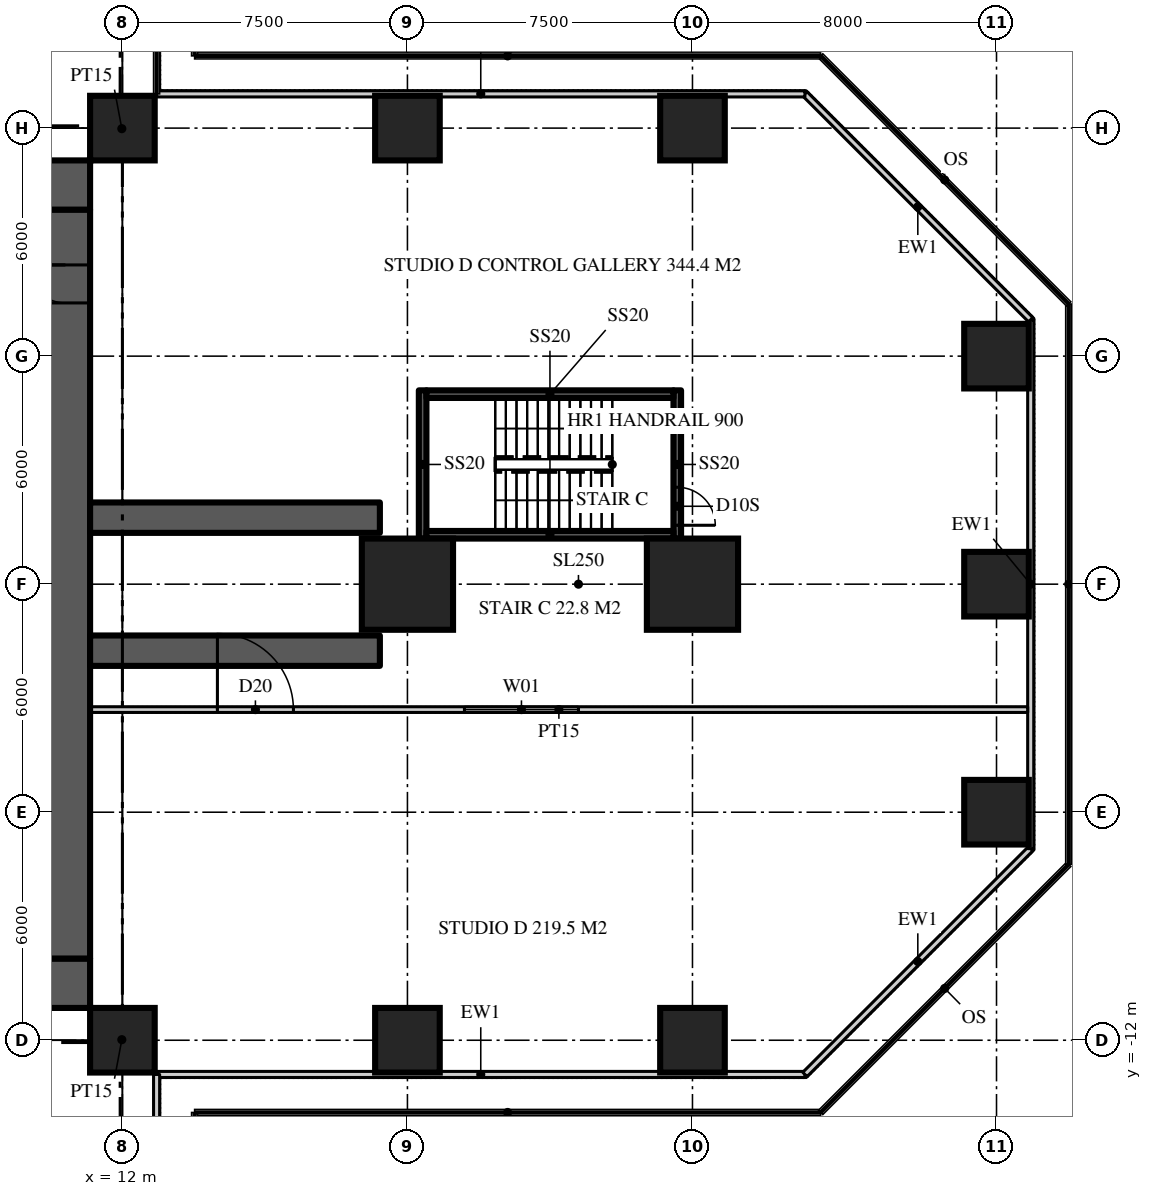
"""IFC4 building model, lengths in metres.
Left out: names, types, materials, properties, quantities, classifications, styles, units other than length and angle.
Written with IfcOpenShell. Run it as: python <this file> out.ifc"""

import sys

from ifc_helpers import new_model, si_unit, direction, frame, frame_2d, origin, origin_2d, place, context, subcontext, project, spatial, rectangle, extrude, element, fill, save


model = new_model("IFC4")
c1 = context("Model", 3, precision=1e-05, world=origin(), true_north=direction((0.0, 1.0)))
c2 = subcontext(c1, "Body", "Model", "MODEL_VIEW")
j1 = project(units=[si_unit("LENGTHUNIT", "METRE"), si_unit("PLANEANGLEUNIT", "RADIAN")], contexts=[c1])
p1 = place(None, origin())
s1 = spatial("IfcSite", under=j1, at=p1, CompositionType="ELEMENT")
p2 = place(p1, origin())
s2 = spatial("IfcBuilding", under=s1, at=p2, CompositionType="ELEMENT")
p3 = place(p2, frame((0.0, 0.0, 15.0)))
s3 = spatial("IfcBuildingStorey", under=s2, at=p3, CompositionType="ELEMENT", Elevation=15.0)
p4 = place(p3, frame((-11.15, 10.5, 0.0), z_axis=(0.0, 0.0, 1.0), x_axis=(1.0, 0.0, 0.0)))
e1 = element("IfcWall", 1, at=p4, inside=s3, PredefinedType="SHEAR", context=c2, shape_type="SweptSolid", body=[
    extrude(rectangle(XDim=22.3, YDim=1.3, at=frame_2d((11.15, 0.0))), origin(), (0.0, 0.0, 1.0), 8.0),
])
p5 = place(p4, frame((4.25, 0.0, 0.0)))
e2 = element("IfcOpeningElement", 2, at=p5, cuts=e1, PredefinedType="OPENING", context=c2, shape_type="SweptSolid", body=[
    extrude(rectangle(XDim=1.8, YDim=2.2, at=frame_2d((0.9, 1.1))), frame((0.0, 0.66, 0.0), z_axis=(0.0, -1.0, 0.0), x_axis=(1.0, 0.0, 0.0)), (0.0, 0.0, 1.0), 1.32),
])
p6 = place(p4, frame((16.25, 0.0, 0.0)))
e3 = element("IfcOpeningElement", 3, at=p6, cuts=e1, PredefinedType="OPENING", context=c2, shape_type="SweptSolid", body=[
    extrude(rectangle(XDim=1.8, YDim=2.2, at=frame_2d((0.9, 1.1))), frame((0.0, 0.66, 0.0), z_axis=(0.0, -1.0, 0.0), x_axis=(1.0, 0.0, 0.0)), (0.0, 0.0, 1.0), 1.32),
])
p7 = place(p3, frame((11.15, -10.5, 0.0), z_axis=(0.0, 0.0, 1.0), x_axis=(-1.0, 0.0, 0.0)))
e4 = element("IfcWall", 4, at=p7, inside=s3, PredefinedType="SHEAR", context=c2, shape_type="SweptSolid", body=[
    extrude(rectangle(XDim=22.3, YDim=1.3, at=frame_2d((11.15, 0.0))), origin(), (0.0, 0.0, 1.0), 8.0),
])
p8 = place(p7, frame((16.25, 0.0, 0.0)))
e5 = element("IfcOpeningElement", 5, at=p8, cuts=e4, PredefinedType="OPENING", context=c2, shape_type="SweptSolid", body=[
    extrude(rectangle(XDim=1.8, YDim=2.2, at=frame_2d((0.9, 1.1))), frame((0.0, 0.66, 0.0), z_axis=(0.0, -1.0, 0.0), x_axis=(1.0, 0.0, 0.0)), (0.0, 0.0, 1.0), 1.32),
])
p9 = place(p7, frame((4.25, 0.0, 0.0)))
e6 = element("IfcOpeningElement", 6, at=p9, cuts=e4, PredefinedType="OPENING", context=c2, shape_type="SweptSolid", body=[
    extrude(rectangle(XDim=1.8, YDim=2.2, at=frame_2d((0.9, 1.1))), frame((0.0, 0.66, 0.0), z_axis=(0.0, -1.0, 0.0), x_axis=(1.0, 0.0, 0.0)), (0.0, 0.0, 1.0), 1.32),
])
p10 = place(p3, frame((10.5, -9.85, 0.0), z_axis=(0.0, 0.0, 1.0), x_axis=(0.0, 1.0, 0.0)))
e7 = element("IfcWall", 7, at=p10, inside=s3, PredefinedType="SHEAR", context=c2, shape_type="SweptSolid", body=[
    extrude(rectangle(XDim=19.7, YDim=1.3, at=frame_2d((9.85, 0.0))), origin(), (0.0, 0.0, 1.0), 8.0),
])
p11 = place(p10, frame((17.25, 0.0, 0.0)))
e8 = element("IfcOpeningElement", 8, at=p11, cuts=e7, PredefinedType="OPENING", context=c2, shape_type="SweptSolid", body=[
    extrude(rectangle(XDim=1.0, YDim=2.2, at=frame_2d((0.5, 1.1))), frame((0.0, 0.66, 0.0), z_axis=(0.0, -1.0, 0.0), x_axis=(1.0, 0.0, 0.0)), (0.0, 0.0, 1.0), 1.32),
])
for number, where, z_axis, x_axis in (
    (9, (11.15, -1.75, 0.0), (0.0, 0.0, 1.0), (1.0, 0.0, 0.0)),
    (10, (11.15, 1.75, 0.0), (0.0, 0.0, 1.0), (1.0, 0.0, 0.0)),
):
    element("IfcWall", number, at=place(p3, frame(where, z_axis=z_axis, x_axis=x_axis)), inside=s3, PredefinedType="SHEAR", context=c2, shape_type="SweptSolid", body=[
        extrude(rectangle(XDim=7.625, YDim=0.8, at=frame_2d((3.812, 0.0))), origin(), (0.0, 0.0, 1.0), 8.0),
    ])
for number, where, z_axis, x_axis in (
    (11, (12.0, -12.0, 0.0), (0.0, 0.0, 1.0), (1.0, 0.0, 0.0)),
    (12, (19.5, -12.0, 0.0), (0.0, 0.0, 1.0), (1.0, 0.0, 0.0)),
    (13, (27.0, -12.0, 0.0), (0.0, 0.0, 1.0), (1.0, 0.0, 0.0)),
    (14, (35.0, -6.0, 0.0), (0.0, 0.0, 1.0), (1.0, 0.0, 0.0)),
):
    element("IfcColumn", number, at=place(p3, frame(where, z_axis=z_axis, x_axis=x_axis)), inside=s3, PredefinedType="COLUMN", context=c2, shape_type="SweptSolid", body=[
        extrude(rectangle(XDim=1.7, YDim=1.7, at=origin_2d()), origin(), (0.0, 0.0, 1.0), 8.0),
    ])
for number, where, z_axis, x_axis in (
    (15, (19.5, 0.0, 0.0), (0.0, 0.0, 1.0), (1.0, 0.0, 0.0)),
    (16, (27.0, 0.0, 0.0), (0.0, 0.0, 1.0), (1.0, 0.0, 0.0)),
):
    element("IfcColumn", number, at=place(p3, frame(where, z_axis=z_axis, x_axis=x_axis)), inside=s3, PredefinedType="COLUMN", context=c2, shape_type="SweptSolid", body=[
        extrude(rectangle(XDim=2.4, YDim=2.4, at=origin_2d()), origin(), (0.0, 0.0, 1.0), 8.0),
    ])
for number, where, z_axis, x_axis in (
    (17, (35.0, 0.0, 0.0), (0.0, 0.0, 1.0), (1.0, 0.0, 0.0)),
    (18, (35.0, 6.0, 0.0), (0.0, 0.0, 1.0), (1.0, 0.0, 0.0)),
    (19, (12.0, 12.0, 0.0), (0.0, 0.0, 1.0), (1.0, 0.0, 0.0)),
    (20, (19.5, 12.0, 0.0), (0.0, 0.0, 1.0), (1.0, 0.0, 0.0)),
    (21, (27.0, 12.0, 0.0), (0.0, 0.0, 1.0), (1.0, 0.0, 0.0)),
):
    element("IfcColumn", number, at=place(p3, frame(where, z_axis=z_axis, x_axis=x_axis)), inside=s3, PredefinedType="COLUMN", context=c2, shape_type="SweptSolid", body=[
        extrude(rectangle(XDim=1.7, YDim=1.7, at=origin_2d()), origin(), (0.0, 0.0, 1.0), 8.0),
    ])
p12 = place(p3, frame((12.9, -12.9, 0.0), z_axis=(0.0, 0.0, 1.0), x_axis=(1.0, 0.0, 0.0)))
e22 = element("IfcWall", 22, at=p12, inside=s3, PredefinedType="SOLIDWALL", context=c2, shape_type="SweptSolid", body=[
    extrude(rectangle(XDim=17.059, YDim=0.16, at=frame_2d((8.529, 0.0))), origin(), (0.0, 0.0, 1.0), 7.75),
])
p13 = place(p3, frame((29.958, -12.9, 0.0), z_axis=(0.0, 0.0, 1.0), x_axis=(0.707106781187, 0.707106781187, 0.0)))
e23 = element("IfcWall", 23, at=p13, inside=s3, PredefinedType="SOLIDWALL", context=c2, shape_type="SweptSolid", body=[
    extrude(rectangle(XDim=8.402, YDim=0.16, at=frame_2d((4.201, 0.0))), origin(), (0.0, 0.0, 1.0), 7.75),
])
p14 = place(p3, frame((35.9, -6.958, 0.0), z_axis=(0.0, 0.0, 1.0), x_axis=(0.0, 1.0, 0.0)))
e24 = element("IfcWall", 24, at=p14, inside=s3, PredefinedType="SOLIDWALL", context=c2, shape_type="SweptSolid", body=[
    extrude(rectangle(XDim=13.917, YDim=0.16, at=frame_2d((6.958, 0.0))), origin(), (0.0, 0.0, 1.0), 7.75),
])
p15 = place(p3, frame((35.9, 6.958, 0.0), z_axis=(0.0, 0.0, 1.0), x_axis=(-0.707106781187, 0.707106781187, 0.0)))
e25 = element("IfcWall", 25, at=p15, inside=s3, PredefinedType="SOLIDWALL", context=c2, shape_type="SweptSolid", body=[
    extrude(rectangle(XDim=8.402, YDim=0.16, at=frame_2d((4.201, 0.0))), origin(), (0.0, 0.0, 1.0), 7.75),
])
for number, where, z_axis, x_axis in (
    (26, (29.958, 12.9, 0.0), (0.0, 0.0, 1.0), (-1.0, 0.0, 0.0)),
    (27, (12.9, -29.958, 0.0), (0.0, 0.0, 1.0), (0.0, 1.0, 0.0)),
):
    element("IfcWall", number, at=place(p3, frame(where, z_axis=z_axis, x_axis=x_axis)), inside=s3, PredefinedType="SOLIDWALL", context=c2, shape_type="SweptSolid", body=[
        extrude(rectangle(XDim=17.059, YDim=0.16, at=frame_2d((8.529, 0.0))), origin(), (0.0, 0.0, 1.0), 7.75),
    ])
p16 = place(p3, frame((11.15, -3.3, 0.0), z_axis=(0.0, 0.0, 1.0), x_axis=(1.0, 0.0, 0.0)))
e28 = element("IfcWall", 28, at=p16, inside=s3, PredefinedType="PARTITIONING", context=c2, shape_type="SweptSolid", body=[
    extrude(rectangle(XDim=24.67, YDim=0.15, at=frame_2d((12.335, 0.0))), origin(), (0.0, 0.0, 1.0), 7.75),
])
p17 = place(p16, frame((3.35, 0.0, 0.0)))
e29 = element("IfcOpeningElement", 29, at=p17, cuts=e28, PredefinedType="OPENING", context=c2, shape_type="SweptSolid", body=[
    extrude(rectangle(XDim=2.0, YDim=2.6, at=frame_2d((1.0, 1.3))), frame((0.0, 0.085, 0.0), z_axis=(0.0, -1.0, 0.0), x_axis=(1.0, 0.0, 0.0)), (0.0, 0.0, 1.0), 0.17),
])
p18 = place(p16, frame((9.85, 0.0, 0.9)))
e30 = element("IfcOpeningElement", 30, at=p18, cuts=e28, PredefinedType="OPENING", context=c2, shape_type="SweptSolid", body=[
    extrude(rectangle(XDim=3.0, YDim=1.5, at=frame_2d((1.5, 0.75))), frame((0.0, 0.085, 0.0), z_axis=(0.0, -1.0, 0.0), x_axis=(1.0, 0.0, 0.0)), (0.0, 0.0, 1.0), 0.17),
])
for number, where, z_axis, x_axis in (
    (31, (11.15, 11.15, 0.0), (0.0, 0.0, 1.0), (0.707, 0.707, 0.0)),
    (32, (11.15, -11.15, 0.0), (0.0, 0.0, 1.0), (0.707, -0.707, 0.0)),
):
    element("IfcWall", number, at=place(p3, frame(where, z_axis=z_axis, x_axis=x_axis)), inside=s3, PredefinedType="PARTITIONING", context=c2, shape_type="SweptSolid", body=[
        extrude(rectangle(XDim=2.362, YDim=0.15, at=frame_2d((1.181, 0.0))), origin(), (0.0, 0.0, 1.0), 7.75),
    ])
p19 = place(p3, frame((19.9, 1.2, 0.0), z_axis=(0.0, 0.0, 1.0), x_axis=(0.0, 1.0, 0.0)))
e33 = element("IfcWall", 33, at=p19, inside=s3, PredefinedType="SOLIDWALL", context=c2, shape_type="SweptSolid", body=[
    extrude(rectangle(XDim=3.9, YDim=0.2, at=frame_2d((1.95, 0.0))), origin(), (0.0, 0.0, 1.0), 7.75),
])
p20 = place(p3, frame((26.6, 5.1, 0.0), z_axis=(0.0, 0.0, 1.0), x_axis=(0.0, -1.0, 0.0)))
e34 = element("IfcWall", 34, at=p20, inside=s3, PredefinedType="SOLIDWALL", context=c2, shape_type="SweptSolid", body=[
    extrude(rectangle(XDim=3.9, YDim=0.2, at=frame_2d((1.95, 0.0))), origin(), (0.0, 0.0, 1.0), 7.75),
])
p21 = place(p20, frame((2.55, 0.0, 0.0)))
e35 = element("IfcOpeningElement", 35, at=p21, cuts=e34, PredefinedType="OPENING", context=c2, shape_type="SweptSolid", body=[
    extrude(rectangle(XDim=1.0, YDim=2.2, at=frame_2d((0.5, 1.1))), frame((0.0, 0.11, 0.0), z_axis=(0.0, -1.0, 0.0), x_axis=(1.0, 0.0, 0.0)), (0.0, 0.0, 1.0), 0.22),
])
for number, where, z_axis, x_axis in (
    (36, (20.0, 1.3, 0.0), (0.0, 0.0, 1.0), (1.0, 0.0, 0.0)),
    (37, (26.5, 5.0, 0.0), (0.0, 0.0, 1.0), (-1.0, 0.0, 0.0)),
):
    element("IfcWall", number, at=place(p3, frame(where, z_axis=z_axis, x_axis=x_axis)), inside=s3, PredefinedType="SOLIDWALL", context=c2, shape_type="SweptSolid", body=[
        extrude(rectangle(XDim=6.5, YDim=0.2, at=frame_2d((3.25, 0.0))), origin(), (0.0, 0.0, 1.0), 7.75),
    ])
p22 = place(p11, origin())
e38 = element("IfcDoor", 38, at=p22, inside=s3, OperationType="SINGLE_SWING_RIGHT", PredefinedType="DOOR", context=c2, shape_type="SweptSolid", body=[
    extrude(rectangle(XDim=1.0, YDim=2.2, at=frame_2d((0.5, 1.1))), frame((0.0, 0.025, 0.0), z_axis=(0.0, -1.0, 0.0), x_axis=(1.0, 0.0, 0.0)), (0.0, 0.0, 1.0), 0.05),
])
fill(e8, e38)
p23 = place(p17, origin())
e39 = element("IfcDoor", 39, at=p23, inside=s3, OperationType="DOUBLE_DOOR_DOUBLE_SWING", PredefinedType="DOOR", context=c2, shape_type="SweptSolid", body=[
    extrude(rectangle(XDim=2.0, YDim=2.6, at=frame_2d((1.0, 1.3))), frame((0.0, 0.025, 0.0), z_axis=(0.0, -1.0, 0.0), x_axis=(1.0, 0.0, 0.0)), (0.0, 0.0, 1.0), 0.05),
])
fill(e29, e39)
p24 = place(p21, origin())
e40 = element("IfcDoor", 40, at=p24, inside=s3, OperationType="SINGLE_SWING_RIGHT", PredefinedType="DOOR", context=c2, shape_type="SweptSolid", body=[
    extrude(rectangle(XDim=1.0, YDim=2.2, at=frame_2d((0.5, 1.1))), frame((0.0, 0.025, 0.0), z_axis=(0.0, -1.0, 0.0), x_axis=(1.0, 0.0, 0.0)), (0.0, 0.0, 1.0), 0.05),
])
fill(e35, e40)
p25 = place(p18, origin())
e41 = element("IfcWindow", 41, at=p25, inside=s3, PartitioningType="SINGLE_PANEL", PredefinedType="WINDOW", context=c2, shape_type="SweptSolid", body=[
    extrude(rectangle(XDim=3.0, YDim=1.5, at=frame_2d((1.5, 0.75))), frame((0.0, 0.03, 0.0), z_axis=(0.0, -1.0, 0.0), x_axis=(1.0, 0.0, 0.0)), (0.0, 0.0, 1.0), 0.06),
])
fill(e30, e41)
save(model, sys.argv[1])
